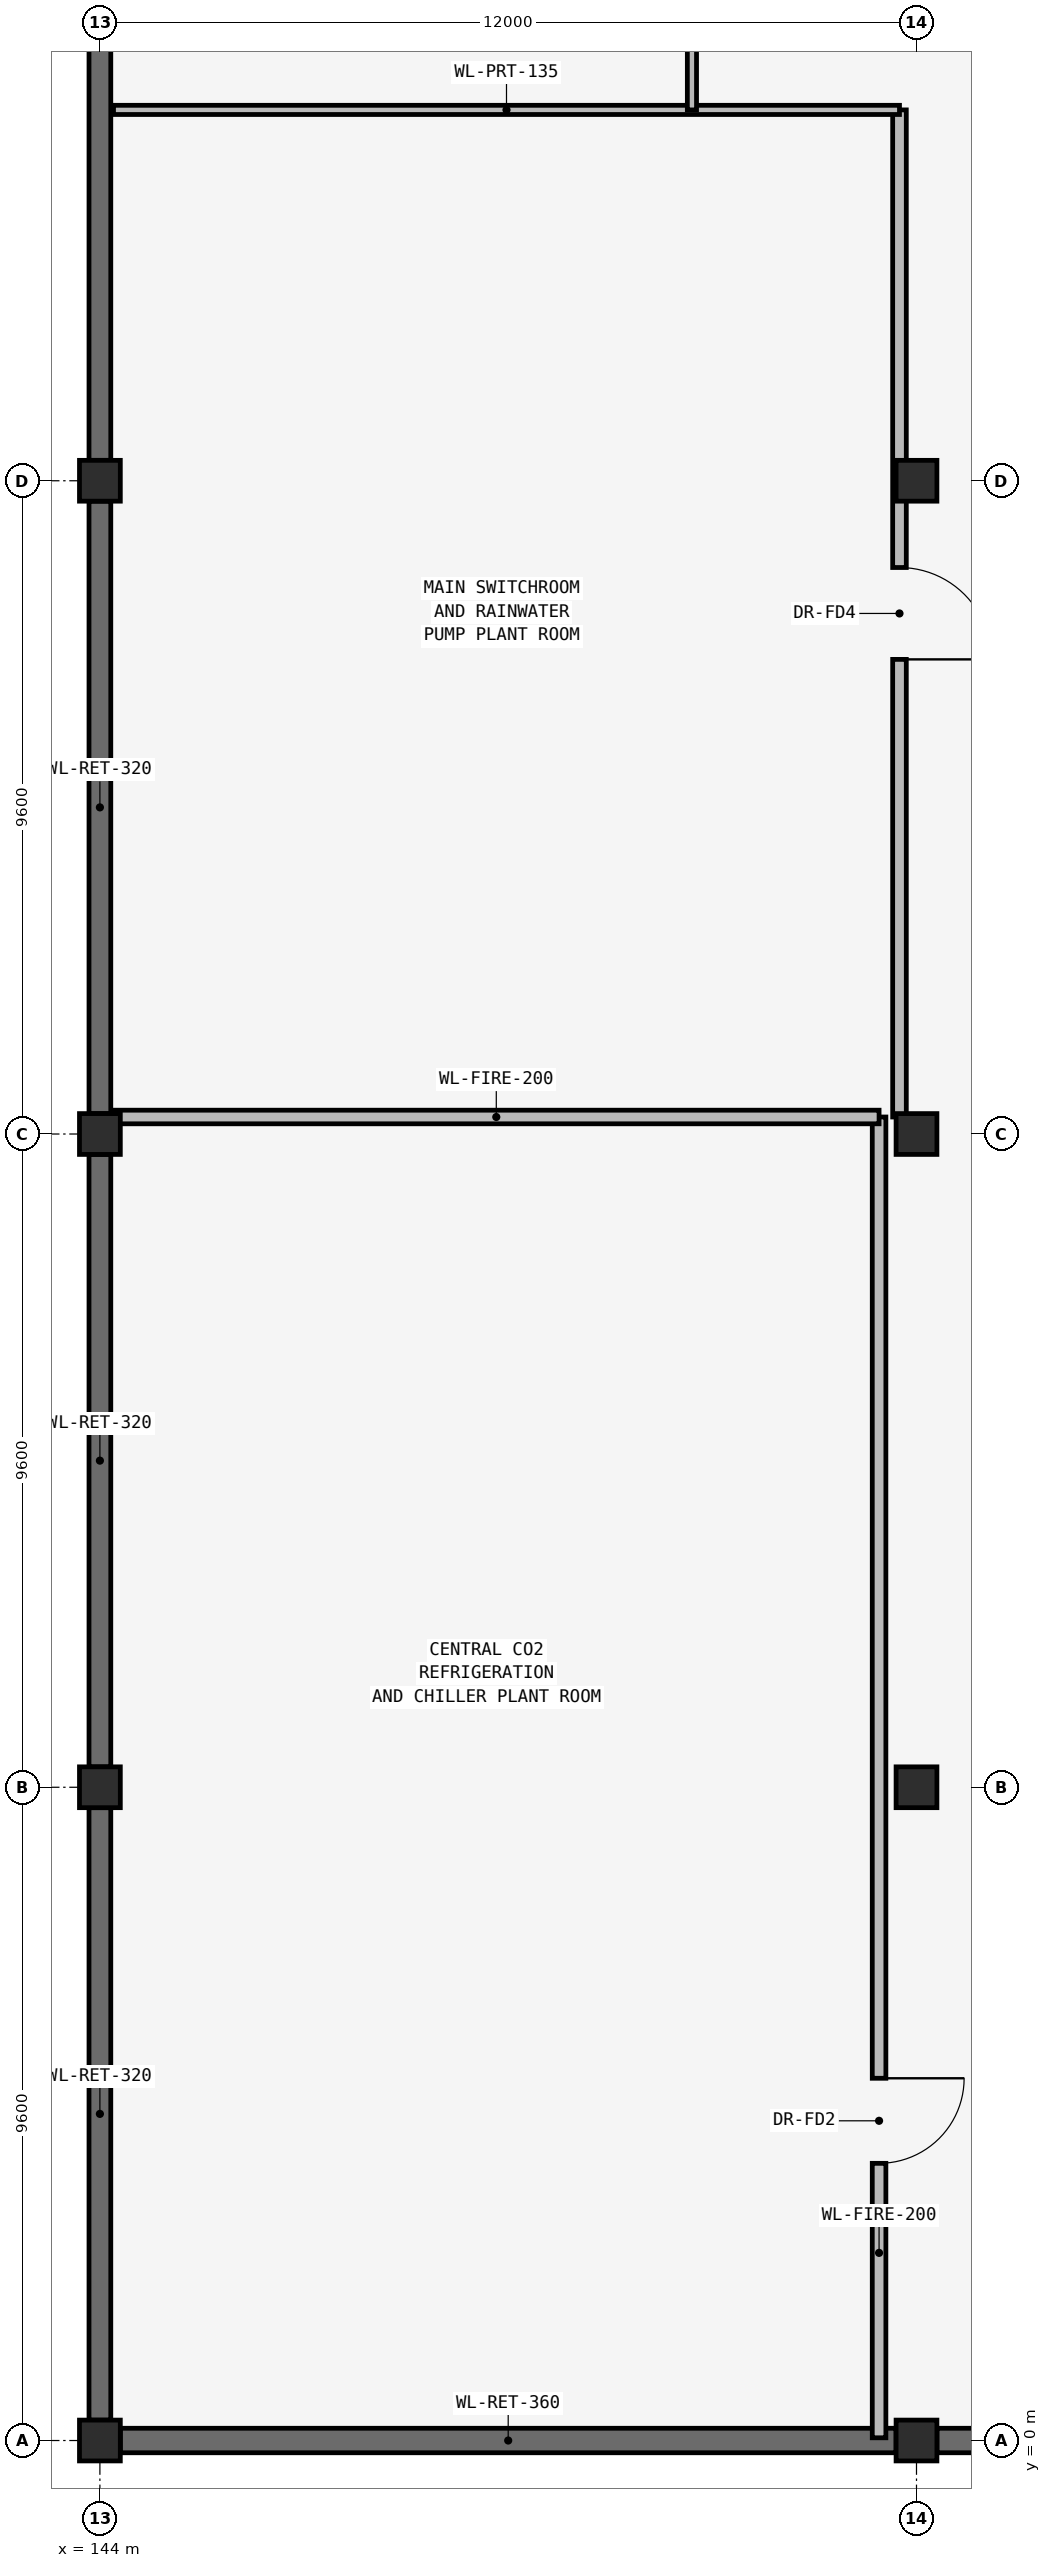
"""IFC4 building model, lengths in metres.
Left out: names, types, materials, properties, quantities, classifications, styles, units other than length and angle.
Written with IfcOpenShell. Run it as: python <this file> out.ifc"""

import sys

from ifc_helpers import new_model, si_unit, direction, frame, frame_2d, origin, origin_2d, place, context, subcontext, project, spatial, rectangle, extrude, element, fill, save


model = new_model("IFC4")
c1 = context("Model", 3, precision=1e-05, world=origin(), true_north=direction((0.0, 1.0)))
c2 = subcontext(c1, "Body", "Model", "MODEL_VIEW")
j1 = project(units=[si_unit("LENGTHUNIT", "METRE"), si_unit("PLANEANGLEUNIT", "RADIAN")], contexts=[c1])
p1 = place(None, origin())
s1 = spatial("IfcSite", under=j1, at=p1, CompositionType="ELEMENT")
p2 = place(p1, origin())
s2 = spatial("IfcBuilding", under=s1, at=p2, CompositionType="ELEMENT")
p3 = place(p2, frame((0.0, 0.0, -4.5)))
s3 = spatial("IfcBuildingStorey", under=s2, at=p3, CompositionType="ELEMENT", Elevation=-4.5)
for number, where, z_axis, x_axis in (
    (1, (144.0, 0.0, -0.35), (0.0, 0.0, 1.0), (1.0, 0.0, 0.0)),
    (2, (144.0, 9.6, -0.35), (0.0, 0.0, 1.0), (1.0, 0.0, 0.0)),
    (3, (144.0, 19.2, -0.35), (0.0, 0.0, 1.0), (1.0, 0.0, 0.0)),
    (4, (144.0, 28.8, -0.35), (0.0, 0.0, 1.0), (1.0, 0.0, 0.0)),
    (5, (156.0, 0.0, -0.35), (0.0, 0.0, 1.0), (1.0, 0.0, 0.0)),
    (6, (156.0, 9.6, -0.35), (0.0, 0.0, 1.0), (1.0, 0.0, 0.0)),
    (7, (156.0, 19.2, -0.35), (0.0, 0.0, 1.0), (1.0, 0.0, 0.0)),
    (8, (156.0, 28.8, -0.35), (0.0, 0.0, 1.0), (1.0, 0.0, 0.0)),
):
    element("IfcColumn", number, at=place(p3, frame(where, z_axis=z_axis, x_axis=x_axis)), inside=s3, PredefinedType="COLUMN", context=c2, shape_type="SweptSolid", body=[
        extrude(rectangle(XDim=0.6, YDim=0.6, at=origin_2d()), origin(), (0.0, 0.0, 1.0), 4.85),
    ])
for number, where, z_axis, x_axis in (
    (9, (144.3, 0.0, 0.0), (0.0, 0.0, 1.0), (1.0, 0.0, 0.0)),
    (10, (156.3, 0.0, 0.0), (0.0, 0.0, 1.0), (1.0, 0.0, 0.0)),
):
    element("IfcWall", number, at=place(p3, frame(where, z_axis=z_axis, x_axis=x_axis)), inside=s3, PredefinedType="USERDEFINED", context=c2, shape_type="SweptSolid", body=[
        extrude(rectangle(XDim=11.4, YDim=0.36, at=frame_2d((5.7, 0.0))), origin(), (0.0, 0.0, 1.0), 4.15),
    ])
for number, where, z_axis, x_axis in (
    (11, (144.0, 0.3, 0.0), (0.0, 0.0, 1.0), (0.0, 1.0, 0.0)),
    (12, (144.0, 9.9, 0.0), (0.0, 0.0, 1.0), (0.0, 1.0, 0.0)),
    (13, (144.0, 19.5, 0.0), (0.0, 0.0, 1.0), (0.0, 1.0, 0.0)),
    (14, (144.0, 29.1, 0.0), (0.0, 0.0, 1.0), (0.0, 1.0, 0.0)),
):
    element("IfcWall", number, at=place(p3, frame(where, z_axis=z_axis, x_axis=x_axis)), inside=s3, PredefinedType="USERDEFINED", context=c2, shape_type="SweptSolid", body=[
        extrude(rectangle(XDim=9.0, YDim=0.32, at=frame_2d((4.5, 0.0))), origin(), (0.0, 0.0, 1.0), 4.15),
    ])
p4 = place(p3, frame((155.45, 0.04, 0.0), z_axis=(0.0, 0.0, 1.0), x_axis=(0.0, 1.0, 0.0)))
e15 = element("IfcWall", 15, at=p4, inside=s3, PredefinedType="SOLIDWALL", context=c2, shape_type="SweptSolid", body=[
    extrude(rectangle(XDim=19.41, YDim=0.2, at=frame_2d((9.705, 0.0))), origin(), (0.0, 0.0, 1.0), 4.15),
])
p5 = place(p4, frame((4.033, 0.0, 0.0)))
e16 = element("IfcOpeningElement", 16, at=p5, cuts=e15, PredefinedType="OPENING", context=c2, shape_type="SweptSolid", body=[
    extrude(rectangle(XDim=1.25, YDim=2.2, at=frame_2d((0.625, 1.1))), frame((0.0, 0.115, 0.0), z_axis=(0.0, -1.0, 0.0), x_axis=(1.0, 0.0, 0.0)), (0.0, 0.0, 1.0), 0.23),
])
p6 = place(p3, frame((144.2, 19.45, 0.0), z_axis=(0.0, 0.0, 1.0), x_axis=(1.0, 0.0, 0.0)))
e17 = element("IfcWall", 17, at=p6, inside=s3, PredefinedType="SOLIDWALL", context=c2, shape_type="SweptSolid", body=[
    extrude(rectangle(XDim=11.25, YDim=0.2, at=frame_2d((5.625, 0.0))), origin(), (0.0, 0.0, 1.0), 3.39),
])
p7 = place(p3, frame((155.75, 19.45, 0.0), z_axis=(0.0, 0.0, 1.0), x_axis=(0.0, 1.0, 0.0)))
e18 = element("IfcWall", 18, at=p7, inside=s3, PredefinedType="SOLIDWALL", context=c2, shape_type="SweptSolid", body=[
    extrude(rectangle(XDim=14.8, YDim=0.2, at=frame_2d((7.4, 0.0))), origin(), (0.0, 0.0, 1.0), 3.39),
])
p8 = place(p7, frame((6.725, 0.0, 0.0)))
e19 = element("IfcOpeningElement", 19, at=p8, cuts=e18, PredefinedType="OPENING", context=c2, shape_type="SweptSolid", body=[
    extrude(rectangle(XDim=1.35, YDim=2.2, at=frame_2d((0.675, 1.1))), frame((0.0, 0.115, 0.0), z_axis=(0.0, -1.0, 0.0), x_axis=(1.0, 0.0, 0.0)), (0.0, 0.0, 1.0), 0.23),
])
p9 = place(p3, frame((144.2, 34.25, 0.0), z_axis=(0.0, 0.0, 1.0), x_axis=(1.0, 0.0, 0.0)))
e20 = element("IfcWall", 20, at=p9, inside=s3, PredefinedType="PARTITIONING", context=c2, shape_type="SweptSolid", body=[
    extrude(rectangle(XDim=11.55, YDim=0.135, at=frame_2d((5.775, 0.0))), origin(), (0.0, 0.0, 1.0), 4.15),
])
p10 = place(p3, frame((152.7, 34.25, 0.0), z_axis=(0.0, 0.0, 1.0), x_axis=(0.0, 1.0, 0.0)))
e21 = element("IfcWall", 21, at=p10, inside=s3, PredefinedType="PARTITIONING", context=c2, shape_type="SweptSolid", body=[
    extrude(rectangle(XDim=11.3, YDim=0.135, at=frame_2d((5.65, 0.0))), origin(), (0.0, 0.0, 1.0), 4.15),
])
p11 = place(p10, frame((5.09, 0.0, 0.0)))
e22 = element("IfcOpeningElement", 22, at=p11, cuts=e21, PredefinedType="OPENING", context=c2, shape_type="SweptSolid", body=[
    extrude(rectangle(XDim=1.12, YDim=2.18, at=frame_2d((0.56, 1.09))), frame((0.0, 0.083, 0.0), z_axis=(0.0, -1.0, 0.0), x_axis=(1.0, 0.0, 0.0)), (0.0, 0.0, 1.0), 0.165),
])
p12 = place(p5, origin())
e23 = element("IfcDoor", 23, at=p12, inside=s3, OperationType="SINGLE_SWING_RIGHT", PredefinedType="DOOR", context=c2, shape_type="SweptSolid", body=[
    extrude(rectangle(XDim=1.25, YDim=2.2, at=frame_2d((0.625, 1.1))), frame((0.0, 0.025, 0.0), z_axis=(0.0, -1.0, 0.0), x_axis=(1.0, 0.0, 0.0)), (0.0, 0.0, 1.0), 0.05),
])
fill(e16, e23)
p13 = place(p8, origin())
e24 = element("IfcDoor", 24, at=p13, inside=s3, OperationType="SINGLE_SWING_LEFT", PredefinedType="DOOR", context=c2, shape_type="SweptSolid", body=[
    extrude(rectangle(XDim=1.35, YDim=2.2, at=frame_2d((0.675, 1.1))), frame((0.0, 0.025, 0.0), z_axis=(0.0, -1.0, 0.0), x_axis=(1.0, 0.0, 0.0)), (0.0, 0.0, 1.0), 0.05),
])
fill(e19, e24)
save(model, sys.argv[1])
